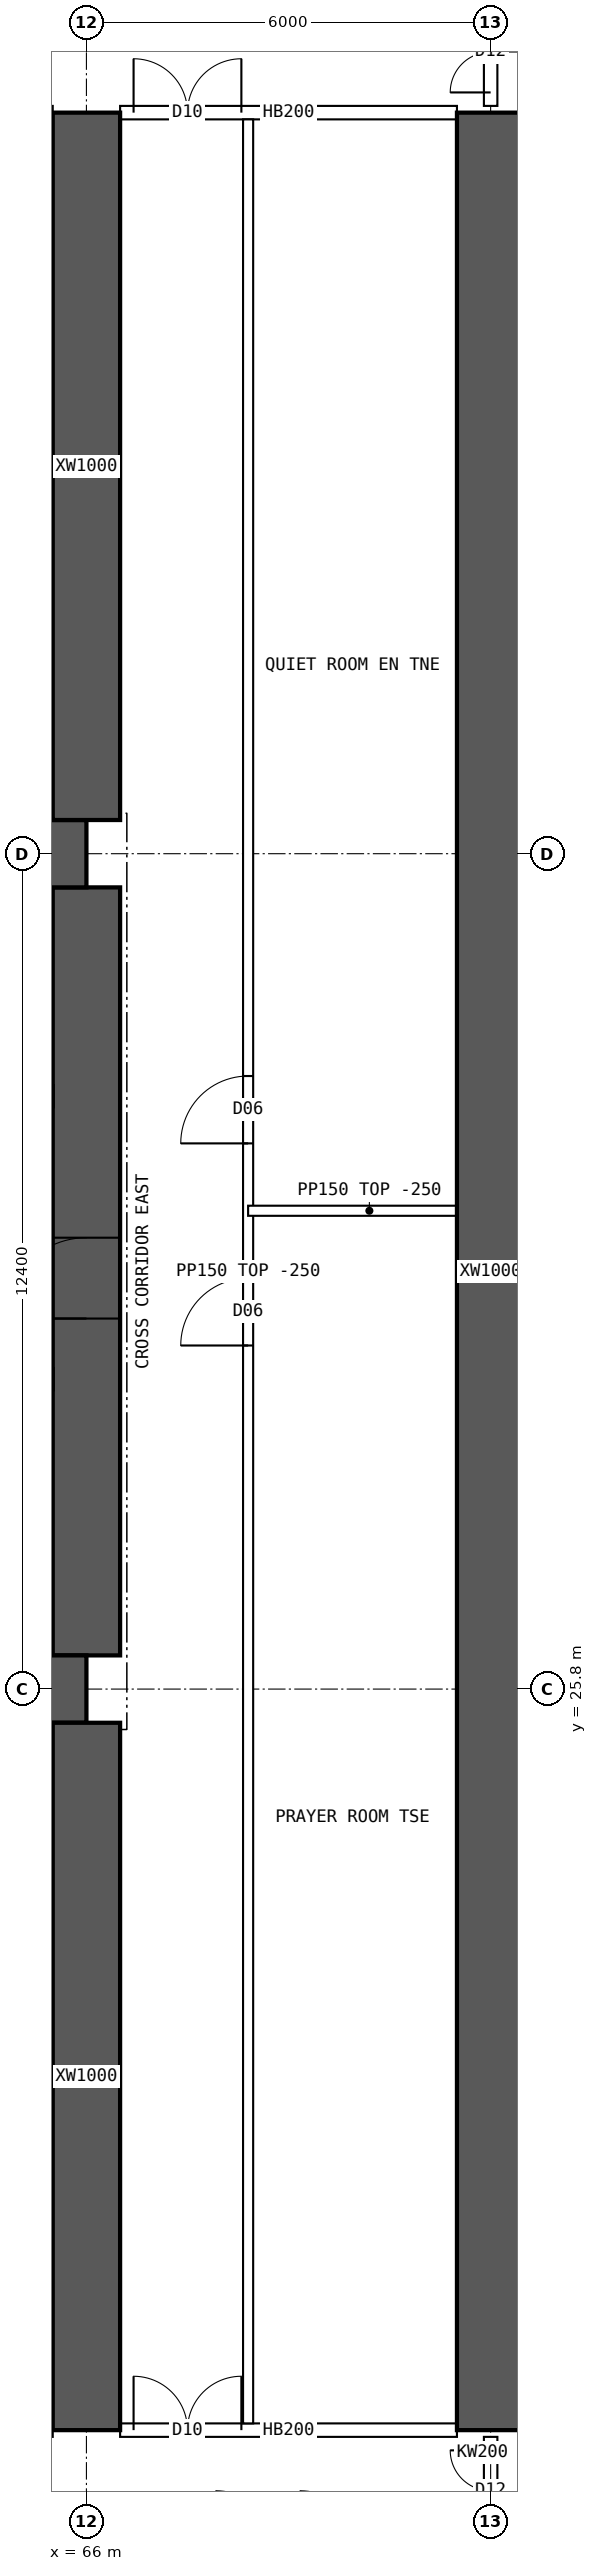
"""IFC4 building model, lengths in metres.
Left out: names, types, materials, properties, quantities, classifications, styles, units other than length and angle.
Written with IfcOpenShell. Run it as: python <this file> out.ifc"""

import sys

from ifc_helpers import new_model, si_unit, direction, frame, frame_2d, origin, place, context, subcontext, project, spatial, polyline, rectangle, outline, extrude, element, fill, save


model = new_model("IFC4")
c1 = context("Model", 3, precision=1e-05, world=origin(), true_north=direction((0.0, 1.0)))
c2 = subcontext(c1, "Body", "Model", "MODEL_VIEW")
j1 = project(units=[si_unit("LENGTHUNIT", "METRE"), si_unit("PLANEANGLEUNIT", "RADIAN")], contexts=[c1])
p1 = place(None, origin())
s1 = spatial("IfcSite", under=j1, at=p1, CompositionType="ELEMENT")
p2 = place(p1, origin())
s2 = spatial("IfcBuilding", under=s1, at=p2, CompositionType="ELEMENT")
p3 = place(p2, frame((0.0, 0.0, 27.7)))
s3 = spatial("IfcBuildingStorey", under=s2, at=p3, CompositionType="ELEMENT", Elevation=27.7)
for number, where, z_axis, x_axis in (
    (1, (18.0, 25.8, 0.0), (0.0, 0.0, 1.0), (1.0, 0.0, 0.0)),
    (2, (18.0, 38.2, 0.0), (0.0, 0.0, 1.0), (1.0, 0.0, 0.0)),
):
    element("IfcWall", number, at=place(p3, frame(where, z_axis=z_axis, x_axis=x_axis)), inside=s3, PredefinedType="SHEAR", context=c2, shape_type="SweptSolid", body=[
        extrude(rectangle(XDim=48.0, YDim=1.0, at=frame_2d((24.0, 0.0))), origin(), (0.0, 0.0, 1.0), 3.75),
    ])
p4 = place(p3, frame((66.0, 26.3, 0.0), z_axis=(0.0, 0.0, 1.0), x_axis=(0.0, 1.0, 0.0)))
e3 = element("IfcWall", 3, at=p4, inside=s3, PredefinedType="SHEAR", context=c2, shape_type="SweptSolid", body=[
    extrude(rectangle(XDim=11.4, YDim=1.0, at=frame_2d((5.7, 0.0))), origin(), (0.0, 0.0, 1.0), 3.75),
])
p5 = place(p4, frame((5.0, 0.0, 0.0)))
e4 = element("IfcOpeningElement", 4, at=p5, cuts=e3, PredefinedType="OPENING", context=c2, shape_type="SweptSolid", body=[
    extrude(rectangle(XDim=1.2, YDim=2.1, at=frame_2d((0.6, 1.05))), frame((0.0, 0.51, 0.0), z_axis=(0.0, -1.0, 0.0), x_axis=(1.0, 0.0, 0.0)), (0.0, 0.0, 1.0), 1.02),
])
for number, where, z_axis, x_axis in (
    (5, (66.0, 14.8, 0.0), (0.0, 0.0, 1.0), (0.0, 1.0, 0.0)),
    (6, (66.0, 38.7, 0.0), (0.0, 0.0, 1.0), (0.0, 1.0, 0.0)),
):
    element("IfcWall", number, at=place(p3, frame(where, z_axis=z_axis, x_axis=x_axis)), inside=s3, PredefinedType="SHEAR", context=c2, shape_type="SweptSolid", body=[
        extrude(rectangle(XDim=10.5, YDim=1.0, at=frame_2d((5.25, 0.0))), origin(), (0.0, 0.0, 1.0), 3.75),
    ])
p6 = place(p3, frame((72.0, 14.8, 0.0), z_axis=(0.0, 0.0, 1.0), x_axis=(0.0, 1.0, 0.0)))
e7 = element("IfcWall", 7, at=p6, inside=s3, PredefinedType="SHEAR", context=c2, shape_type="SweptSolid", body=[
    extrude(rectangle(XDim=34.4, YDim=1.0, at=frame_2d((17.2, 0.0))), origin(), (0.0, 0.0, 1.0), 3.75),
])
p7 = place(p3, frame((66.5, 14.8, 0.0), z_axis=(0.0, 0.0, 1.0), x_axis=(1.0, 0.0, 0.0)))
e8 = element("IfcWall", 8, at=p7, inside=s3, PredefinedType="SOLIDWALL", context=c2, shape_type="SweptSolid", body=[
    extrude(rectangle(XDim=5.0, YDim=0.2, at=frame_2d((2.5, 0.0))), origin(), (0.0, 0.0, 1.0), 3.5),
])
p8 = place(p7, frame((0.2, 0.0, 0.0)))
e9 = element("IfcOpeningElement", 9, at=p8, cuts=e8, PredefinedType="OPENING", context=c2, shape_type="SweptSolid", body=[
    extrude(rectangle(XDim=1.6, YDim=2.1, at=frame_2d((0.8, 1.05))), frame((0.0, 0.11, 0.0), z_axis=(0.0, -1.0, 0.0), x_axis=(1.0, 0.0, 0.0)), (0.0, 0.0, 1.0), 0.22),
])
p9 = place(p3, frame((66.5, 49.2, 0.0), z_axis=(0.0, 0.0, 1.0), x_axis=(1.0, 0.0, 0.0)))
e10 = element("IfcWall", 10, at=p9, inside=s3, PredefinedType="SOLIDWALL", context=c2, shape_type="SweptSolid", body=[
    extrude(rectangle(XDim=5.0, YDim=0.2, at=frame_2d((2.5, 0.0))), origin(), (0.0, 0.0, 1.0), 3.5),
])
p10 = place(p9, frame((0.2, 0.0, 0.0)))
e11 = element("IfcOpeningElement", 11, at=p10, cuts=e10, PredefinedType="OPENING", context=c2, shape_type="SweptSolid", body=[
    extrude(rectangle(XDim=1.6, YDim=2.1, at=frame_2d((0.8, 1.05))), frame((0.0, 0.11, 0.0), z_axis=(0.0, -1.0, 0.0), x_axis=(1.0, 0.0, 0.0)), (0.0, 0.0, 1.0), 0.22),
])
p11 = place(p3, frame((68.4, 14.9, 0.0), z_axis=(0.0, 0.0, 1.0), x_axis=(0.0, 1.0, 0.0)))
e12 = element("IfcWall", 12, at=p11, inside=s3, PredefinedType="PARTITIONING", context=c2, shape_type="SweptSolid", body=[
    extrude(rectangle(XDim=34.2, YDim=0.15, at=frame_2d((17.1, 0.0))), origin(), (0.0, 0.0, 1.0), 3.5),
])
p12 = place(p11, frame((16.0, 0.0, 0.0)))
e13 = element("IfcOpeningElement", 13, at=p12, cuts=e12, PredefinedType="OPENING", context=c2, shape_type="SweptSolid", body=[
    extrude(rectangle(XDim=1.0, YDim=2.1, at=frame_2d((0.5, 1.05))), frame((0.0, 0.085, 0.0), z_axis=(0.0, -1.0, 0.0), x_axis=(1.0, 0.0, 0.0)), (0.0, 0.0, 1.0), 0.17),
])
p13 = place(p11, frame((19.0, 0.0, 0.0)))
e14 = element("IfcOpeningElement", 14, at=p13, cuts=e12, PredefinedType="OPENING", context=c2, shape_type="SweptSolid", body=[
    extrude(rectangle(XDim=1.0, YDim=2.1, at=frame_2d((0.5, 1.05))), frame((0.0, 0.085, 0.0), z_axis=(0.0, -1.0, 0.0), x_axis=(1.0, 0.0, 0.0)), (0.0, 0.0, 1.0), 0.17),
])
p14 = place(p3, frame((68.4, 32.9, 0.0), z_axis=(0.0, 0.0, 1.0), x_axis=(1.0, 0.0, 0.0)))
e15 = element("IfcWall", 15, at=p14, inside=s3, PredefinedType="PARTITIONING", context=c2, shape_type="SweptSolid", body=[
    extrude(rectangle(XDim=3.6, YDim=0.15, at=frame_2d((1.8, 0.0))), origin(), (0.0, 0.0, 1.0), 3.5),
])
p15 = place(p3, frame((72.075, 30.85, 0.0), z_axis=(0.0, 0.0, 1.0), x_axis=(1.0, 0.0, 0.0)))
e16 = element("IfcWall", 16, at=p15, inside=s3, PredefinedType="PARTITIONING", context=c2, shape_type="SweptSolid", body=[
    extrude(outline(polyline([(0.0, 0.0), (8.02, 0.0), (8.02, 3.5), (6.227, 3.5), (6.225, 3.05), (5.627, 3.05), (5.625, 3.5), (0.0, 3.5), (0.0, 0.0)])), frame((0.0, 0.075, 0.0), z_axis=(0.0, -1.0, 0.0), x_axis=(1.0, 0.0, 0.0)), (0.0, 0.0, 1.0), 0.15),
])
p16 = place(p3, frame((72.0, 13.1, 0.0), z_axis=(0.0, 0.0, 1.0), x_axis=(0.0, 1.0, 0.0)))
e17 = element("IfcWall", 17, at=p16, inside=s3, PredefinedType="SOLIDWALL", context=c2, shape_type="SweptSolid", body=[
    extrude(outline(polyline([(0.0, 0.0), (1.6, 0.0), (1.6, 3.05), (0.0, 3.05), (0.0, 0.0)])), frame((0.0, 0.1, 0.0), z_axis=(0.0, -1.0, 0.0), x_axis=(1.0, 0.0, 0.0)), (0.0, 0.0, 1.0), 0.2),
])
p17 = place(p16, frame((0.2, 0.0, 0.0)))
e18 = element("IfcOpeningElement", 18, at=p17, cuts=e17, PredefinedType="OPENING", context=c2, shape_type="SweptSolid", body=[
    extrude(rectangle(XDim=1.2, YDim=2.1, at=frame_2d((0.6, 1.05))), frame((0.0, 0.11, 0.0), z_axis=(0.0, -1.0, 0.0), x_axis=(1.0, 0.0, 0.0)), (0.0, 0.0, 1.0), 0.22),
])
p18 = place(p3, frame((72.0, 49.3, 0.0), z_axis=(0.0, 0.0, 1.0), x_axis=(0.0, 1.0, 0.0)))
e19 = element("IfcWall", 19, at=p18, inside=s3, PredefinedType="SOLIDWALL", context=c2, shape_type="SweptSolid", body=[
    extrude(outline(polyline([(0.0, 0.0), (1.6, 0.0), (1.6, 3.05), (0.0, 3.05), (0.0, 0.0)])), frame((0.0, 0.1, 0.0), z_axis=(0.0, -1.0, 0.0), x_axis=(1.0, 0.0, 0.0)), (0.0, 0.0, 1.0), 0.2),
])
p19 = place(p18, frame((0.2, 0.0, 0.0)))
e20 = element("IfcOpeningElement", 20, at=p19, cuts=e19, PredefinedType="OPENING", context=c2, shape_type="SweptSolid", body=[
    extrude(rectangle(XDim=1.2, YDim=2.1, at=frame_2d((0.6, 1.05))), frame((0.0, 0.11, 0.0), z_axis=(0.0, -1.0, 0.0), x_axis=(1.0, 0.0, 0.0)), (0.0, 0.0, 1.0), 0.22),
])
p20 = place(p5, origin())
e21 = element("IfcDoor", 21, at=p20, inside=s3, OperationType="SINGLE_SWING_LEFT", PredefinedType="DOOR", context=c2, shape_type="SweptSolid", body=[
    extrude(rectangle(XDim=1.2, YDim=2.1, at=frame_2d((0.6, 1.05))), frame((0.0, 0.025, 0.0), z_axis=(0.0, -1.0, 0.0), x_axis=(1.0, 0.0, 0.0)), (0.0, 0.0, 1.0), 0.05),
])
fill(e4, e21)
p21 = place(p8, origin())
e22 = element("IfcDoor", 22, at=p21, inside=s3, OperationType="DOUBLE_DOOR_SINGLE_SWING", PredefinedType="DOOR", context=c2, shape_type="SweptSolid", body=[
    extrude(rectangle(XDim=1.6, YDim=2.1, at=frame_2d((0.8, 1.05))), frame((0.0, 0.025, 0.0), z_axis=(0.0, -1.0, 0.0), x_axis=(1.0, 0.0, 0.0)), (0.0, 0.0, 1.0), 0.05),
])
fill(e9, e22)
p22 = place(p10, origin())
e23 = element("IfcDoor", 23, at=p22, inside=s3, OperationType="DOUBLE_DOOR_SINGLE_SWING", PredefinedType="DOOR", context=c2, shape_type="SweptSolid", body=[
    extrude(rectangle(XDim=1.6, YDim=2.1, at=frame_2d((0.8, 1.05))), frame((0.0, 0.025, 0.0), z_axis=(0.0, -1.0, 0.0), x_axis=(1.0, 0.0, 0.0)), (0.0, 0.0, 1.0), 0.05),
])
fill(e11, e23)
p23 = place(p12, origin())
e24 = element("IfcDoor", 24, at=p23, inside=s3, OperationType="SINGLE_SWING_LEFT", PredefinedType="DOOR", context=c2, shape_type="SweptSolid", body=[
    extrude(rectangle(XDim=1.0, YDim=2.1, at=frame_2d((0.5, 1.05))), frame((0.0, 0.025, 0.0), z_axis=(0.0, -1.0, 0.0), x_axis=(1.0, 0.0, 0.0)), (0.0, 0.0, 1.0), 0.05),
])
fill(e13, e24)
p24 = place(p13, origin())
e25 = element("IfcDoor", 25, at=p24, inside=s3, OperationType="SINGLE_SWING_LEFT", PredefinedType="DOOR", context=c2, shape_type="SweptSolid", body=[
    extrude(rectangle(XDim=1.0, YDim=2.1, at=frame_2d((0.5, 1.05))), frame((0.0, 0.025, 0.0), z_axis=(0.0, -1.0, 0.0), x_axis=(1.0, 0.0, 0.0)), (0.0, 0.0, 1.0), 0.05),
])
fill(e14, e25)
p25 = place(p17, origin())
e26 = element("IfcDoor", 26, at=p25, inside=s3, OperationType="DOUBLE_DOOR_SINGLE_SWING", PredefinedType="DOOR", context=c2, shape_type="SweptSolid", body=[
    extrude(rectangle(XDim=1.2, YDim=2.1, at=frame_2d((0.6, 1.05))), frame((0.0, 0.025, 0.0), z_axis=(0.0, -1.0, 0.0), x_axis=(1.0, 0.0, 0.0)), (0.0, 0.0, 1.0), 0.05),
])
fill(e18, e26)
p26 = place(p19, origin())
e27 = element("IfcDoor", 27, at=p26, inside=s3, OperationType="DOUBLE_DOOR_SINGLE_SWING", PredefinedType="DOOR", context=c2, shape_type="SweptSolid", body=[
    extrude(rectangle(XDim=1.2, YDim=2.1, at=frame_2d((0.6, 1.05))), frame((0.0, 0.025, 0.0), z_axis=(0.0, -1.0, 0.0), x_axis=(1.0, 0.0, 0.0)), (0.0, 0.0, 1.0), 0.05),
])
fill(e20, e27)
save(model, sys.argv[1])
